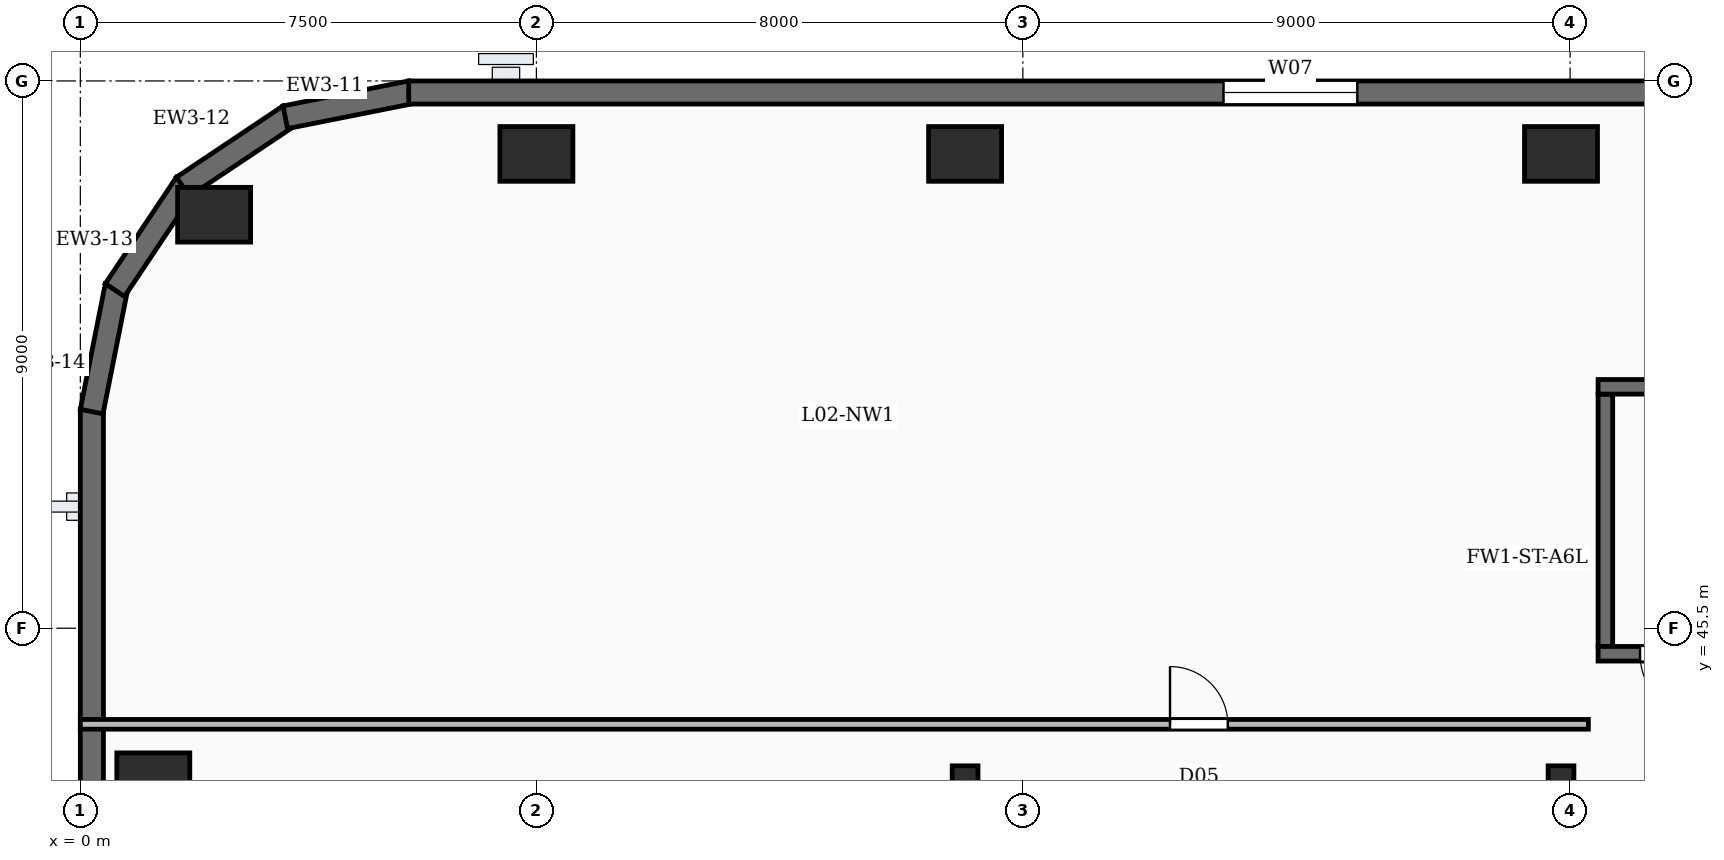
"""IFC4 building model, lengths in metres.
Left out: names, types, materials, properties, quantities, classifications, styles, units other than length and angle.
Written with IfcOpenShell. Run it as: python <this file> out.ifc"""

import sys

from ifc_helpers import new_model, si_unit, direction, frame, frame_2d, origin, origin_2d, place, context, subcontext, project, spatial, rectangle, i_section, extrude, element, fill, save


model = new_model("IFC4")
c1 = context("Model", 3, precision=1e-05, world=origin(), true_north=direction((0.0, 1.0)))
c2 = subcontext(c1, "Body", "Model", "MODEL_VIEW")
j1 = project(units=[si_unit("LENGTHUNIT", "METRE"), si_unit("PLANEANGLEUNIT", "RADIAN")], contexts=[c1])
p1 = place(None, origin())
s1 = spatial("IfcSite", under=j1, at=p1, CompositionType="ELEMENT")
p2 = place(p1, origin())
s2 = spatial("IfcBuilding", under=s1, at=p2, CompositionType="ELEMENT")
p3 = place(p2, frame((0.0, 0.0, 13.0)))
s3 = spatial("IfcBuildingStorey", under=s2, at=p3, CompositionType="ELEMENT", Elevation=13.0)
for number, where, z_axis, x_axis in (
    (1, (24.35, 53.3, -0.35), (0.0, 0.0, 1.0), (1.0, 0.0, 0.0)),
    (2, (14.55, 53.3, -0.35), (0.0, 0.0, 1.0), (1.0, 0.0, 0.0)),
    (3, (7.5, 53.3, -0.35), (0.0, 0.0, 1.0), (1.0, 0.0, 0.0)),
    (4, (2.2, 52.3, -0.35), (0.0, 0.0, 1.0), (1.0, 0.0, 0.0)),
    (5, (1.2, 43.0, -0.35), (0.0, 0.0, 1.0), (1.0, 0.0, 0.0)),
):
    element("IfcColumn", number, at=place(p3, frame(where, z_axis=z_axis, x_axis=x_axis)), inside=s3, PredefinedType="COLUMN", context=c2, shape_type="SweptSolid", body=[
        extrude(rectangle(XDim=1.2, YDim=0.9, at=origin_2d()), origin(), (0.0, 0.0, 1.0), 5.0),
    ])
for number, where, z_axis, x_axis in (
    (6, (14.55, 43.0, -0.35), (0.0, 0.0, 1.0), (1.0, 0.0, 0.0)),
    (7, (24.35, 43.0, -0.35), (0.0, 0.0, 1.0), (1.0, 0.0, 0.0)),
):
    element("IfcColumn", number, at=place(p3, frame(where, z_axis=z_axis, x_axis=x_axis)), inside=s3, PredefinedType="COLUMN", context=c2, shape_type="SweptSolid", body=[
        extrude(i_section(OverallWidth=0.424, OverallDepth=0.474, WebThickness=0.048, FlangeThickness=0.077, FilletRadius=0.02, at=origin_2d()), origin(), (0.0, 0.0, 1.0), 5.0),
    ])
p4 = place(p3, frame((5.4, 54.31, 0.0), z_axis=(0.0, 0.0, 1.0), x_axis=(1.0, 0.0, 0.0)))
e8 = element("IfcWall", 8, at=p4, inside=s3, PredefinedType="SOLIDWALL", context=c2, shape_type="SweptSolid", body=[
    extrude(rectangle(XDim=68.7, YDim=0.38, at=frame_2d((34.35, 0.0))), origin(), (0.0, 0.0, 1.0), 4.65),
])
p5 = place(p4, frame((13.4, 0.0, 0.95)))
e9 = element("IfcOpeningElement", 9, at=p5, cuts=e8, PredefinedType="OPENING", context=c2, shape_type="SweptSolid", body=[
    extrude(rectangle(XDim=2.2, YDim=2.5, at=frame_2d((1.1, 1.25))), frame((0.0, 0.2, 0.0), z_axis=(0.0, -1.0, 0.0), x_axis=(1.0, 0.0, 0.0)), (0.0, 0.0, 1.0), 0.4),
])
p6 = place(p4, frame((24.2, 0.0, 0.95)))
e10 = element("IfcOpeningElement", 10, at=p6, cuts=e8, PredefinedType="OPENING", context=c2, shape_type="SweptSolid", body=[
    extrude(rectangle(XDim=2.2, YDim=2.5, at=frame_2d((1.1, 1.25))), frame((0.0, 0.2, 0.0), z_axis=(0.0, -1.0, 0.0), x_axis=(1.0, 0.0, 0.0)), (0.0, 0.0, 1.0), 0.4),
])
p7 = place(p4, frame((35.0, 0.0, 0.95)))
e11 = element("IfcOpeningElement", 11, at=p7, cuts=e8, PredefinedType="OPENING", context=c2, shape_type="SweptSolid", body=[
    extrude(rectangle(XDim=2.2, YDim=2.5, at=frame_2d((1.1, 1.25))), frame((0.0, 0.2, 0.0), z_axis=(0.0, -1.0, 0.0), x_axis=(1.0, 0.0, 0.0)), (0.0, 0.0, 1.0), 0.4),
])
p8 = place(p4, frame((40.4, 0.0, 0.95)))
e12 = element("IfcOpeningElement", 12, at=p8, cuts=e8, PredefinedType="OPENING", context=c2, shape_type="SweptSolid", body=[
    extrude(rectangle(XDim=2.2, YDim=2.5, at=frame_2d((1.1, 1.25))), frame((0.0, 0.2, 0.0), z_axis=(0.0, -1.0, 0.0), x_axis=(1.0, 0.0, 0.0)), (0.0, 0.0, 1.0), 0.4),
])
p9 = place(p4, frame((51.2, 0.0, 0.95)))
e13 = element("IfcOpeningElement", 13, at=p9, cuts=e8, PredefinedType="OPENING", context=c2, shape_type="SweptSolid", body=[
    extrude(rectangle(XDim=2.2, YDim=2.5, at=frame_2d((1.1, 1.25))), frame((0.0, 0.2, 0.0), z_axis=(0.0, -1.0, 0.0), x_axis=(1.0, 0.0, 0.0)), (0.0, 0.0, 1.0), 0.4),
])
p10 = place(p4, frame((56.6, 0.0, 0.95)))
e14 = element("IfcOpeningElement", 14, at=p10, cuts=e8, PredefinedType="OPENING", context=c2, shape_type="SweptSolid", body=[
    extrude(rectangle(XDim=2.2, YDim=2.5, at=frame_2d((1.1, 1.25))), frame((0.0, 0.2, 0.0), z_axis=(0.0, -1.0, 0.0), x_axis=(1.0, 0.0, 0.0)), (0.0, 0.0, 1.0), 0.4),
])
p11 = place(p4, frame((62.0, 0.0, 0.95)))
e15 = element("IfcOpeningElement", 15, at=p11, cuts=e8, PredefinedType="OPENING", context=c2, shape_type="SweptSolid", body=[
    extrude(rectangle(XDim=2.2, YDim=2.5, at=frame_2d((1.1, 1.25))), frame((0.0, 0.2, 0.0), z_axis=(0.0, -1.0, 0.0), x_axis=(1.0, 0.0, 0.0)), (0.0, 0.0, 1.0), 0.4),
])
for number, where, z_axis, x_axis in (
    (16, (3.371, 53.903, 0.0), (0.0, 0.0, 1.0), (0.981, 0.195, 0.0)),
    (17, (1.687, 52.76, 0.0), (0.0, 0.0, 1.0), (0.832, 0.556, 0.0)),
    (18, (0.569, 51.061, 0.0), (0.0, 0.0, 1.0), (0.556, 0.832, 0.0)),
    (19, (0.186, 49.063, 0.0), (0.0, 0.0, 1.0), (0.195, 0.981, 0.0)),
):
    element("IfcWall", number, at=place(p3, frame(where, z_axis=z_axis, x_axis=x_axis)), inside=s3, PredefinedType="SOLIDWALL", context=c2, shape_type="SweptSolid", body=[
        extrude(rectangle(XDim=2.107, YDim=0.38, at=frame_2d((1.053, 0.0))), origin(), (0.0, 0.0, 1.0), 4.65),
    ])
p12 = place(p3, frame((0.19, 5.4, 0.0), z_axis=(0.0, 0.0, 1.0), x_axis=(0.0, 1.0, 0.0)))
e20 = element("IfcWall", 20, at=p12, inside=s3, PredefinedType="SOLIDWALL", context=c2, shape_type="SweptSolid", body=[
    extrude(rectangle(XDim=43.7, YDim=0.38, at=frame_2d((21.85, 0.0))), origin(), (0.0, 0.0, 1.0), 4.65),
])
p13 = place(p12, frame((2.6, 0.0, 0.95)))
e21 = element("IfcOpeningElement", 21, at=p13, cuts=e20, PredefinedType="OPENING", context=c2, shape_type="SweptSolid", body=[
    extrude(rectangle(XDim=2.2, YDim=2.5, at=frame_2d((1.1, 1.25))), frame((0.0, 0.2, 0.0), z_axis=(0.0, -1.0, 0.0), x_axis=(1.0, 0.0, 0.0)), (0.0, 0.0, 1.0), 0.4),
])
p14 = place(p12, frame((8.0, 0.0, 0.95)))
e22 = element("IfcOpeningElement", 22, at=p14, cuts=e20, PredefinedType="OPENING", context=c2, shape_type="SweptSolid", body=[
    extrude(rectangle(XDim=2.2, YDim=2.5, at=frame_2d((1.1, 1.25))), frame((0.0, 0.2, 0.0), z_axis=(0.0, -1.0, 0.0), x_axis=(1.0, 0.0, 0.0)), (0.0, 0.0, 1.0), 0.4),
])
p15 = place(p12, frame((18.8, 0.0, 0.95)))
e23 = element("IfcOpeningElement", 23, at=p15, cuts=e20, PredefinedType="OPENING", context=c2, shape_type="SweptSolid", body=[
    extrude(rectangle(XDim=2.2, YDim=2.5, at=frame_2d((1.1, 1.25))), frame((0.0, 0.2, 0.0), z_axis=(0.0, -1.0, 0.0), x_axis=(1.0, 0.0, 0.0)), (0.0, 0.0, 1.0), 0.4),
])
p16 = place(p12, frame((24.2, 0.0, 0.95)))
e24 = element("IfcOpeningElement", 24, at=p16, cuts=e20, PredefinedType="OPENING", context=c2, shape_type="SweptSolid", body=[
    extrude(rectangle(XDim=2.2, YDim=2.5, at=frame_2d((1.1, 1.25))), frame((0.0, 0.2, 0.0), z_axis=(0.0, -1.0, 0.0), x_axis=(1.0, 0.0, 0.0)), (0.0, 0.0, 1.0), 0.4),
])
p17 = place(p12, frame((29.6, 0.0, 0.95)))
e25 = element("IfcOpeningElement", 25, at=p17, cuts=e20, PredefinedType="OPENING", context=c2, shape_type="SweptSolid", body=[
    extrude(rectangle(XDim=2.2, YDim=2.5, at=frame_2d((1.1, 1.25))), frame((0.0, 0.2, 0.0), z_axis=(0.0, -1.0, 0.0), x_axis=(1.0, 0.0, 0.0)), (0.0, 0.0, 1.0), 0.4),
])
p18 = place(p3, frame((34.84, 45.08, 0.0), z_axis=(0.0, 0.0, 1.0), x_axis=(-1.0, 0.0, 0.0)))
e26 = element("IfcWall", 26, at=p18, inside=s3, PredefinedType="SOLIDWALL", context=c2, shape_type="SweptSolid", body=[
    extrude(rectangle(XDim=9.88, YDim=0.24, at=frame_2d((4.94, 0.0))), origin(), (0.0, 0.0, 1.0), 4.65),
])
p19 = place(p18, frame((8.09, 0.0, 0.0)))
e27 = element("IfcOpeningElement", 27, at=p19, cuts=e26, PredefinedType="OPENING", context=c2, shape_type="SweptSolid", body=[
    extrude(rectangle(XDim=1.1, YDim=2.15, at=frame_2d((0.55, 1.075))), frame((0.0, 0.13, 0.0), z_axis=(0.0, -1.0, 0.0), x_axis=(1.0, 0.0, 0.0)), (0.0, 0.0, 1.0), 0.26),
])
p20 = place(p3, frame((24.96, 49.47, 0.0), z_axis=(0.0, 0.0, 1.0), x_axis=(1.0, 0.0, 0.0)))
e28 = element("IfcWall", 28, at=p20, inside=s3, PredefinedType="SOLIDWALL", context=c2, shape_type="SweptSolid", body=[
    extrude(rectangle(XDim=9.88, YDim=0.24, at=frame_2d((4.94, 0.0))), origin(), (0.0, 0.0, 1.0), 4.65),
])
p21 = place(p3, frame((25.08, 45.2, 0.0), z_axis=(0.0, 0.0, 1.0), x_axis=(0.0, 1.0, 0.0)))
e29 = element("IfcWall", 29, at=p21, inside=s3, PredefinedType="SOLIDWALL", context=c2, shape_type="SweptSolid", body=[
    extrude(rectangle(XDim=4.15, YDim=0.24, at=frame_2d((2.075, 0.0))), origin(), (0.0, 0.0, 1.0), 4.65),
])
p22 = place(p3, frame((0.0, 43.92, 0.0), z_axis=(0.0, 0.0, 1.0), x_axis=(1.0, 0.0, 0.0)))
e30 = element("IfcWall", 30, at=p22, inside=s3, PredefinedType="PARTITIONING", context=c2, shape_type="SweptSolid", body=[
    extrude(rectangle(XDim=24.8, YDim=0.16, at=frame_2d((12.4, 0.0))), origin(), (0.0, 0.0, 1.0), 3.71),
])
p23 = place(p22, frame((17.92, 0.0, 0.0)))
e31 = element("IfcOpeningElement", 31, at=p23, cuts=e30, PredefinedType="OPENING", context=c2, shape_type="SweptSolid", body=[
    extrude(rectangle(XDim=0.95, YDim=2.15, at=frame_2d((0.475, 1.075))), frame((0.0, 0.09, 0.0), z_axis=(0.0, -1.0, 0.0), x_axis=(1.0, 0.0, 0.0)), (0.0, 0.0, 1.0), 0.18),
])
p24 = place(p5, origin())
e32 = element("IfcWindow", 32, at=p24, inside=s3, PartitioningType="DOUBLE_PANEL_VERTICAL", PredefinedType="WINDOW", context=c2, shape_type="SweptSolid", body=[
    extrude(rectangle(XDim=2.2, YDim=2.5, at=frame_2d((1.1, 1.25))), frame((0.0, 0.03, 0.0), z_axis=(0.0, -1.0, 0.0), x_axis=(1.0, 0.0, 0.0)), (0.0, 0.0, 1.0), 0.06),
])
fill(e9, e32)
p25 = place(p19, origin())
e33 = element("IfcDoor", 33, at=p25, inside=s3, OperationType="SINGLE_SWING_LEFT", PredefinedType="DOOR", context=c2, shape_type="SweptSolid", body=[
    extrude(rectangle(XDim=1.1, YDim=2.15, at=frame_2d((0.55, 1.075))), frame((0.0, 0.025, 0.0), z_axis=(0.0, -1.0, 0.0), x_axis=(1.0, 0.0, 0.0)), (0.0, 0.0, 1.0), 0.05),
])
fill(e27, e33)
p26 = place(p23, origin())
e34 = element("IfcDoor", 34, at=p26, inside=s3, OperationType="SINGLE_SWING_LEFT", PredefinedType="DOOR", context=c2, shape_type="SweptSolid", body=[
    extrude(rectangle(XDim=0.95, YDim=2.15, at=frame_2d((0.475, 1.075))), frame((0.0, 0.025, 0.0), z_axis=(0.0, -1.0, 0.0), x_axis=(1.0, 0.0, 0.0)), (0.0, 0.0, 1.0), 0.05),
])
fill(e31, e34)
save(model, sys.argv[1])
